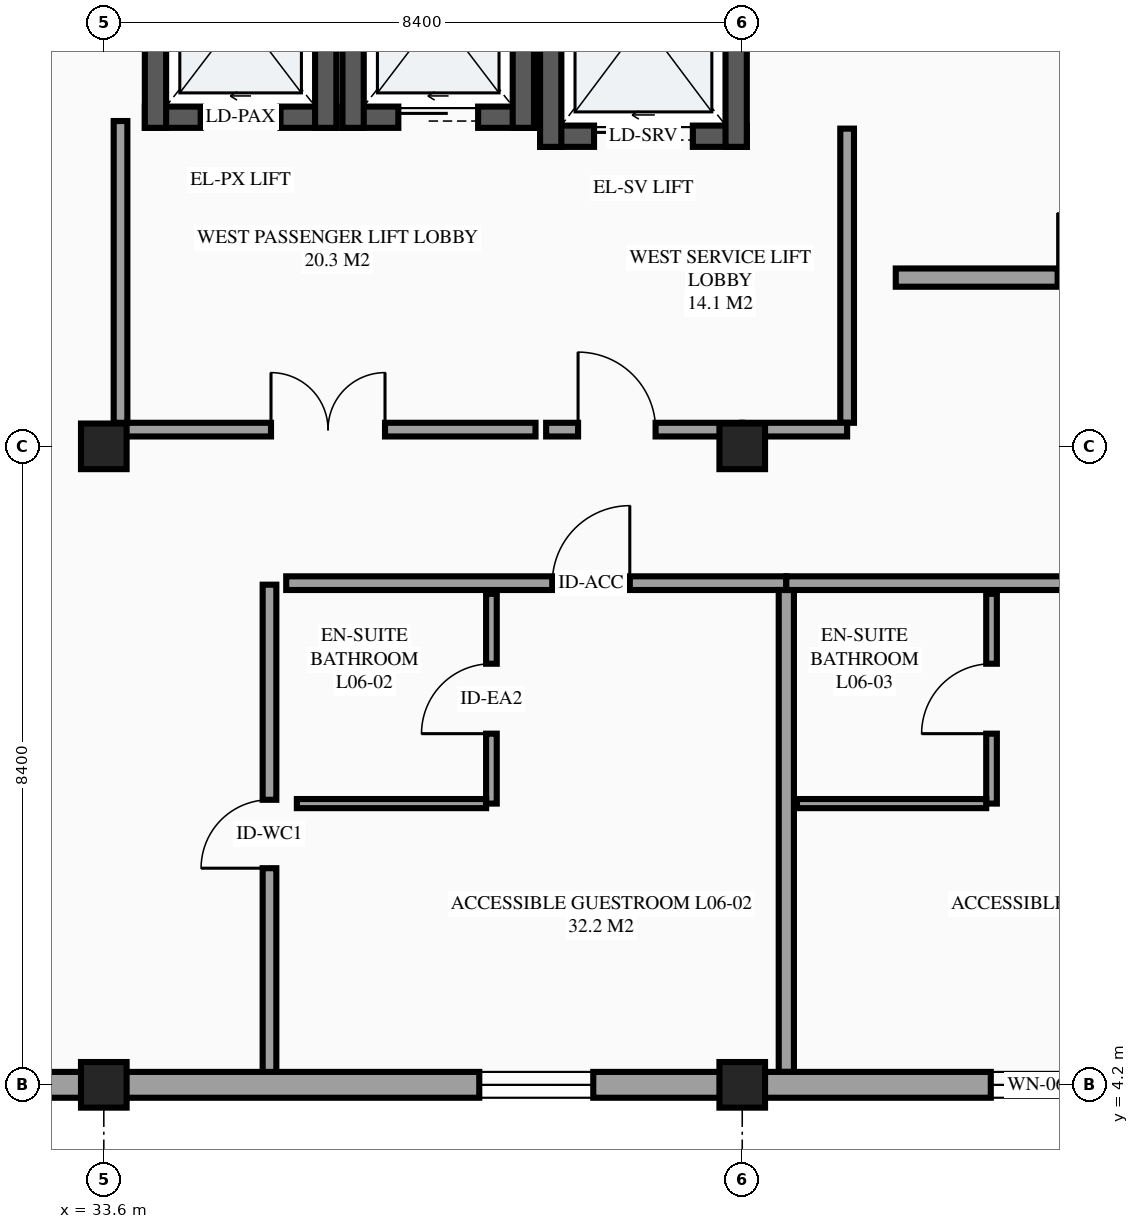
"""IFC4 building model, lengths in metres.
Left out: names, types, materials, properties, quantities, classifications, styles, units other than length and angle.
Written with IfcOpenShell. Run it as: python <this file> out.ifc"""

import sys

from ifc_helpers import new_model, si_unit, direction, frame, frame_2d, origin, origin_2d, place, context, subcontext, project, spatial, rectangle, extrude, element, fill, save


model = new_model("IFC4")
c1 = context("Model", 3, precision=1e-05, world=origin(), true_north=direction((0.0, 1.0)))
c2 = subcontext(c1, "Body", "Model", "MODEL_VIEW")
j1 = project(units=[si_unit("LENGTHUNIT", "METRE"), si_unit("PLANEANGLEUNIT", "RADIAN")], contexts=[c1])
p1 = place(None, origin())
s1 = spatial("IfcSite", under=j1, at=p1, CompositionType="ELEMENT")
p2 = place(p1, origin())
s2 = spatial("IfcBuilding", under=s1, at=p2, CompositionType="ELEMENT")
p3 = place(p2, frame((0.0, 0.0, 25.5)))
s3 = spatial("IfcBuildingStorey", under=s2, at=p3, CompositionType="ELEMENT", Elevation=25.5)
for number, where, z_axis, x_axis in (
    (1, (33.6, 4.2, 0.0), (0.0, 0.0, 1.0), (1.0, 0.0, 0.0)),
    (2, (33.6, 12.6, 0.0), (0.0, 0.0, 1.0), (1.0, 0.0, 0.0)),
    (3, (42.0, 4.2, 0.0), (0.0, 0.0, 1.0), (1.0, 0.0, 0.0)),
    (4, (42.0, 12.6, 0.0), (0.0, 0.0, 1.0), (1.0, 0.0, 0.0)),
):
    element("IfcColumn", number, at=place(p3, frame(where, z_axis=z_axis, x_axis=x_axis)), inside=s3, PredefinedType="COLUMN", context=c2, shape_type="SweptSolid", body=[
        extrude(rectangle(XDim=0.6, YDim=0.6, at=origin_2d()), origin(), (0.0, 0.0, 1.0), 3.6),
    ])
p4 = place(p3, frame((34.14, 16.93, 0.0), z_axis=(0.0, 0.0, 1.0), x_axis=(1.0, 0.0, 0.0)))
e5 = element("IfcWall", 5, at=p4, inside=s3, PredefinedType="SHEAR", context=c2, shape_type="SweptSolid", body=[
    extrude(rectangle(XDim=2.52, YDim=0.28, at=frame_2d((1.26, 0.0))), origin(), (0.0, 0.0, 1.0), 3.6),
])
p5 = place(p4, frame((0.735, 0.0, 0.0)))
e6 = element("IfcOpeningElement", 6, at=p5, cuts=e5, PredefinedType="OPENING", context=c2, shape_type="SweptSolid", body=[
    extrude(rectangle(XDim=1.05, YDim=2.2, at=frame_2d((0.525, 1.1))), frame((0.0, 0.15, 0.0), z_axis=(0.0, -1.0, 0.0), x_axis=(1.0, 0.0, 0.0)), (0.0, 0.0, 1.0), 0.3),
])
for number, where, z_axis, x_axis in (
    (7, (36.52, 16.79, 0.0), (0.0, 0.0, 1.0), (0.0, 1.0, 0.0)),
    (8, (34.28, 19.81, 0.0), (0.0, 0.0, 1.0), (0.0, -1.0, 0.0)),
):
    element("IfcWall", number, at=place(p3, frame(where, z_axis=z_axis, x_axis=x_axis)), inside=s3, PredefinedType="SHEAR", context=c2, shape_type="SweptSolid", body=[
        extrude(rectangle(XDim=3.02, YDim=0.28, at=frame_2d((1.51, 0.0))), origin(), (0.0, 0.0, 1.0), 3.6),
    ])
p6 = place(p3, frame((36.74, 16.93, 0.0), z_axis=(0.0, 0.0, 1.0), x_axis=(1.0, 0.0, 0.0)))
e9 = element("IfcWall", 9, at=p6, inside=s3, PredefinedType="SHEAR", context=c2, shape_type="SweptSolid", body=[
    extrude(rectangle(XDim=2.52, YDim=0.28, at=frame_2d((1.26, 0.0))), origin(), (0.0, 0.0, 1.0), 3.6),
])
p7 = place(p6, frame((0.735, 0.0, 0.0)))
e10 = element("IfcOpeningElement", 10, at=p7, cuts=e9, PredefinedType="OPENING", context=c2, shape_type="SweptSolid", body=[
    extrude(rectangle(XDim=1.05, YDim=2.2, at=frame_2d((0.525, 1.1))), frame((0.0, 0.15, 0.0), z_axis=(0.0, -1.0, 0.0), x_axis=(1.0, 0.0, 0.0)), (0.0, 0.0, 1.0), 0.3),
])
for number, where, z_axis, x_axis in (
    (11, (39.12, 16.79, 0.0), (0.0, 0.0, 1.0), (0.0, 1.0, 0.0)),
    (12, (36.88, 19.81, 0.0), (0.0, 0.0, 1.0), (0.0, -1.0, 0.0)),
):
    element("IfcWall", number, at=place(p3, frame(where, z_axis=z_axis, x_axis=x_axis)), inside=s3, PredefinedType="SHEAR", context=c2, shape_type="SweptSolid", body=[
        extrude(rectangle(XDim=3.02, YDim=0.28, at=frame_2d((1.51, 0.0))), origin(), (0.0, 0.0, 1.0), 3.6),
    ])
p8 = place(p3, frame((39.34, 16.68, 0.0), z_axis=(0.0, 0.0, 1.0), x_axis=(1.0, 0.0, 0.0)))
e13 = element("IfcWall", 13, at=p8, inside=s3, PredefinedType="SHEAR", context=c2, shape_type="SweptSolid", body=[
    extrude(rectangle(XDim=2.72, YDim=0.28, at=frame_2d((1.36, 0.0))), origin(), (0.0, 0.0, 1.0), 3.6),
])
p9 = place(p8, frame((0.71, 0.0, 0.0)))
e14 = element("IfcOpeningElement", 14, at=p9, cuts=e13, PredefinedType="OPENING", context=c2, shape_type="SweptSolid", body=[
    extrude(rectangle(XDim=1.3, YDim=2.25, at=frame_2d((0.65, 1.125))), frame((0.0, 0.15, 0.0), z_axis=(0.0, -1.0, 0.0), x_axis=(1.0, 0.0, 0.0)), (0.0, 0.0, 1.0), 0.3),
])
for number, where, z_axis, x_axis in (
    (15, (41.92, 16.54, 0.0), (0.0, 0.0, 1.0), (0.0, 1.0, 0.0)),
    (16, (39.48, 19.86, 0.0), (0.0, 0.0, 1.0), (0.0, -1.0, 0.0)),
):
    element("IfcWall", number, at=place(p3, frame(where, z_axis=z_axis, x_axis=x_axis)), inside=s3, PredefinedType="SHEAR", context=c2, shape_type="SweptSolid", body=[
        extrude(rectangle(XDim=3.32, YDim=0.28, at=frame_2d((1.66, 0.0))), origin(), (0.0, 0.0, 1.0), 3.6),
    ])
p10 = place(p3, frame((36.0, 10.8, 0.0), z_axis=(0.0, 0.0, 1.0), x_axis=(1.0, 0.0, 0.0)))
e17 = element("IfcWall", 17, at=p10, inside=s3, PredefinedType="PARTITIONING", context=c2, shape_type="SweptSolid", body=[
    extrude(rectangle(XDim=6.58, YDim=0.18, at=frame_2d((3.29, 0.0))), origin(), (0.0, 0.0, 1.0), 3.375),
])
p11 = place(p10, frame((3.5, 0.0, 0.0)))
e18 = element("IfcOpeningElement", 18, at=p11, cuts=e17, PredefinedType="OPENING", context=c2, shape_type="SweptSolid", body=[
    extrude(rectangle(XDim=1.02, YDim=2.15, at=frame_2d((0.51, 1.075))), frame((0.0, 0.1, 0.0), z_axis=(0.0, -1.0, 0.0), x_axis=(1.0, 0.0, 0.0)), (0.0, 0.0, 1.0), 0.2),
])
p12 = place(p3, frame((42.58, 4.37, 0.0), z_axis=(0.0, 0.0, 1.0), x_axis=(0.0, 1.0, 0.0)))
e19 = element("IfcWall", 19, at=p12, inside=s3, PredefinedType="PARTITIONING", context=c2, shape_type="SweptSolid", body=[
    extrude(rectangle(XDim=6.34, YDim=0.2, at=frame_2d((3.17, 0.0))), origin(), (0.0, 0.0, 1.0), 3.375),
])
p13 = place(p3, frame((38.7, 7.9, 0.0), z_axis=(0.0, 0.0, 1.0), x_axis=(0.0, 1.0, 0.0)))
e20 = element("IfcWall", 20, at=p13, inside=s3, PredefinedType="PARTITIONING", context=c2, shape_type="SweptSolid", body=[
    extrude(rectangle(XDim=2.76, YDim=0.14, at=frame_2d((1.38, 0.0))), origin(), (0.0, 0.0, 1.0), 3.375),
])
p14 = place(p13, frame((0.92, 0.0, 0.0)))
e21 = element("IfcOpeningElement", 21, at=p14, cuts=e20, PredefinedType="OPENING", context=c2, shape_type="SweptSolid", body=[
    extrude(rectangle(XDim=0.92, YDim=2.1, at=frame_2d((0.46, 1.05))), frame((0.0, 0.08, 0.0), z_axis=(0.0, -1.0, 0.0), x_axis=(1.0, 0.0, 0.0)), (0.0, 0.0, 1.0), 0.16),
])
p15 = place(p3, frame((36.14, 7.9, 0.0), z_axis=(0.0, 0.0, 1.0), x_axis=(1.0, 0.0, 0.0)))
e22 = element("IfcWall", 22, at=p15, inside=s3, PredefinedType="PARTITIONING", context=c2, shape_type="SweptSolid", body=[
    extrude(rectangle(XDim=2.49, YDim=0.12, at=frame_2d((1.245, 0.0))), origin(), (0.0, 0.0, 1.0), 3.375),
])
p16 = place(p3, frame((42.58, 10.8, 0.0), z_axis=(0.0, 0.0, 1.0), x_axis=(1.0, 0.0, 0.0)))
e23 = element("IfcWall", 23, at=p16, inside=s3, PredefinedType="PARTITIONING", context=c2, shape_type="SweptSolid", body=[
    extrude(rectangle(XDim=6.58, YDim=0.18, at=frame_2d((3.29, 0.0))), origin(), (0.0, 0.0, 1.0), 3.375),
])
p17 = place(p16, frame((4.551, 0.0, 0.0)))
e24 = element("IfcOpeningElement", 24, at=p17, cuts=e23, PredefinedType="OPENING", context=c2, shape_type="SweptSolid", body=[
    extrude(rectangle(XDim=1.02, YDim=2.15, at=frame_2d((0.51, 1.075))), frame((0.0, 0.1, 0.0), z_axis=(0.0, -1.0, 0.0), x_axis=(1.0, 0.0, 0.0)), (0.0, 0.0, 1.0), 0.2),
])
p18 = place(p3, frame((45.28, 7.9, 0.0), z_axis=(0.0, 0.0, 1.0), x_axis=(0.0, 1.0, 0.0)))
e25 = element("IfcWall", 25, at=p18, inside=s3, PredefinedType="PARTITIONING", context=c2, shape_type="SweptSolid", body=[
    extrude(rectangle(XDim=2.76, YDim=0.14, at=frame_2d((1.38, 0.0))), origin(), (0.0, 0.0, 1.0), 3.375),
])
p19 = place(p18, frame((0.92, 0.0, 0.0)))
e26 = element("IfcOpeningElement", 26, at=p19, cuts=e25, PredefinedType="OPENING", context=c2, shape_type="SweptSolid", body=[
    extrude(rectangle(XDim=0.92, YDim=2.1, at=frame_2d((0.46, 1.05))), frame((0.0, 0.08, 0.0), z_axis=(0.0, -1.0, 0.0), x_axis=(1.0, 0.0, 0.0)), (0.0, 0.0, 1.0), 0.16),
])
p20 = place(p3, frame((42.72, 7.9, 0.0), z_axis=(0.0, 0.0, 1.0), x_axis=(1.0, 0.0, 0.0)))
e27 = element("IfcWall", 27, at=p20, inside=s3, PredefinedType="PARTITIONING", context=c2, shape_type="SweptSolid", body=[
    extrude(rectangle(XDim=2.49, YDim=0.12, at=frame_2d((1.245, 0.0))), origin(), (0.0, 0.0, 1.0), 3.375),
])
p21 = place(p3, frame((33.82, 12.82, 0.0), z_axis=(0.0, 0.0, 1.0), x_axis=(1.0, 0.0, 0.0)))
e28 = element("IfcWall", 28, at=p21, inside=s3, PredefinedType="PARTITIONING", context=c2, shape_type="SweptSolid", body=[
    extrude(rectangle(XDim=5.46, YDim=0.18, at=frame_2d((2.73, 0.0))), origin(), (0.0, 0.0, 1.0), 2.48),
])
p22 = place(p21, frame((1.98, 0.0, 0.0)))
e29 = element("IfcOpeningElement", 29, at=p22, cuts=e28, PredefinedType="OPENING", context=c2, shape_type="SweptSolid", body=[
    extrude(rectangle(XDim=1.5, YDim=2.15, at=frame_2d((0.75, 1.075))), frame((0.0, 0.1, 0.0), z_axis=(0.0, -1.0, 0.0), x_axis=(1.0, 0.0, 0.0)), (0.0, 0.0, 1.0), 0.2),
])
p23 = place(p3, frame((33.82, 12.91, 0.0), z_axis=(0.0, 0.0, 1.0), x_axis=(0.0, 1.0, 0.0)))
e30 = element("IfcWall", 30, at=p23, inside=s3, PredefinedType="PARTITIONING", context=c2, shape_type="SweptSolid", body=[
    extrude(rectangle(XDim=3.97, YDim=0.18, at=frame_2d((1.985, 0.0))), origin(), (0.0, 0.0, 1.0), 2.53),
])
p24 = place(p3, frame((39.42, 12.82, 0.0), z_axis=(0.0, 0.0, 1.0), x_axis=(1.0, 0.0, 0.0)))
e31 = element("IfcWall", 31, at=p24, inside=s3, PredefinedType="PARTITIONING", context=c2, shape_type="SweptSolid", body=[
    extrude(rectangle(XDim=2.58, YDim=0.18, at=frame_2d((1.29, 0.0))), origin(), (0.0, 0.0, 1.0), 2.48),
])
p25 = place(p24, frame((0.42, 0.0, 0.0)))
e32 = element("IfcOpeningElement", 32, at=p25, cuts=e31, PredefinedType="OPENING", context=c2, shape_type="SweptSolid", body=[
    extrude(rectangle(XDim=1.02, YDim=2.15, at=frame_2d((0.51, 1.075))), frame((0.0, 0.1, 0.0), z_axis=(0.0, -1.0, 0.0), x_axis=(1.0, 0.0, 0.0)), (0.0, 0.0, 1.0), 0.2),
])
p26 = place(p3, frame((43.38, 12.91, 0.0), z_axis=(0.0, 0.0, 1.0), x_axis=(0.0, 1.0, 0.0)))
e33 = element("IfcWall", 33, at=p26, inside=s3, PredefinedType="PARTITIONING", context=c2, shape_type="SweptSolid", body=[
    extrude(rectangle(XDim=3.87, YDim=0.18, at=frame_2d((1.935, 0.0))), origin(), (0.0, 0.0, 1.0), 3.375),
])
p27 = place(p3, frame((44.02, 14.82, 0.0), z_axis=(0.0, 0.0, 1.0), x_axis=(1.0, 0.0, 0.0)))
e34 = element("IfcWall", 34, at=p27, inside=s3, PredefinedType="PARTITIONING", context=c2, shape_type="SweptSolid", body=[
    extrude(rectangle(XDim=5.96, YDim=0.24, at=frame_2d((2.98, 0.0))), origin(), (0.0, 0.0, 1.0), 3.375),
])
p28 = place(p27, frame((2.13, 0.0, 0.0)))
e35 = element("IfcOpeningElement", 35, at=p28, cuts=e34, PredefinedType="OPENING", context=c2, shape_type="SweptSolid", body=[
    extrude(rectangle(XDim=1.7, YDim=2.2, at=frame_2d((0.85, 1.1))), frame((0.0, 0.13, 0.0), z_axis=(0.0, -1.0, 0.0), x_axis=(1.0, 0.0, 0.0)), (0.0, 0.0, 1.0), 0.26),
])
p29 = place(p3, frame((35.78, 4.22, 0.0), z_axis=(0.0, 0.0, 1.0), x_axis=(0.0, 1.0, 0.0)))
e36 = element("IfcWall", 36, at=p29, inside=s3, PredefinedType="PARTITIONING", context=c2, shape_type="SweptSolid", body=[
    extrude(rectangle(XDim=6.56, YDim=0.18, at=frame_2d((3.28, 0.0))), origin(), (0.0, 0.0, 1.0), 3.375),
])
p30 = place(p29, frame((2.83, 0.0, 0.0)))
e37 = element("IfcOpeningElement", 37, at=p30, cuts=e36, PredefinedType="OPENING", context=c2, shape_type="SweptSolid", body=[
    extrude(rectangle(XDim=0.9, YDim=2.12, at=frame_2d((0.45, 1.06))), frame((0.0, 0.1, 0.0), z_axis=(0.0, -1.0, 0.0), x_axis=(1.0, 0.0, 0.0)), (0.0, 0.0, 1.0), 0.2),
])
p31 = place(p3, frame((25.2, 4.2, 0.0), z_axis=(0.0, 0.0, 1.0), x_axis=(1.0, 0.0, 0.0)))
e38 = element("IfcWall", 38, at=p31, inside=s3, PredefinedType="STANDARD", context=c2, shape_type="SweptSolid", body=[
    extrude(rectangle(XDim=8.4, YDim=0.34, at=frame_2d((4.2, 0.0))), origin(), (0.0, 0.0, 1.0), 2.63),
])
p32 = place(p31, frame((2.25, 0.0, 0.75)))
e39 = element("IfcOpeningElement", 39, at=p32, cuts=e38, PredefinedType="OPENING", context=c2, shape_type="SweptSolid", body=[
    extrude(rectangle(XDim=2.1, YDim=1.5, at=frame_2d((1.05, 0.75))), frame((0.0, 0.18, 0.0), z_axis=(0.0, -1.0, 0.0), x_axis=(1.0, 0.0, 0.0)), (0.0, 0.0, 1.0), 0.36),
])
p33 = place(p3, frame((33.6, 4.2, 0.0), z_axis=(0.0, 0.0, 1.0), x_axis=(1.0, 0.0, 0.0)))
e40 = element("IfcWall", 40, at=p33, inside=s3, PredefinedType="STANDARD", context=c2, shape_type="SweptSolid", body=[
    extrude(rectangle(XDim=8.4, YDim=0.34, at=frame_2d((4.2, 0.0))), origin(), (0.0, 0.0, 1.0), 3.07),
])
p34 = place(p33, frame((4.94, 0.0, 0.85)))
e41 = element("IfcOpeningElement", 41, at=p34, cuts=e40, PredefinedType="OPENING", context=c2, shape_type="SweptSolid", body=[
    extrude(rectangle(XDim=1.5, YDim=1.5, at=frame_2d((0.75, 0.75))), frame((0.0, 0.18, 0.0), z_axis=(0.0, -1.0, 0.0), x_axis=(1.0, 0.0, 0.0)), (0.0, 0.0, 1.0), 0.36),
])
p35 = place(p3, frame((42.0, 4.2, 0.0), z_axis=(0.0, 0.0, 1.0), x_axis=(1.0, 0.0, 0.0)))
e42 = element("IfcWall", 42, at=p35, inside=s3, PredefinedType="STANDARD", context=c2, shape_type="SweptSolid", body=[
    extrude(rectangle(XDim=16.8, YDim=0.34, at=frame_2d((8.4, 0.0))), origin(), (0.0, 0.0, 1.0), 2.68),
])
p36 = place(p35, frame((3.27, 0.0, 0.85)))
e43 = element("IfcOpeningElement", 43, at=p36, cuts=e42, PredefinedType="OPENING", context=c2, shape_type="SweptSolid", body=[
    extrude(rectangle(XDim=1.2, YDim=1.5, at=frame_2d((0.6, 0.75))), frame((0.0, 0.18, 0.0), z_axis=(0.0, -1.0, 0.0), x_axis=(1.0, 0.0, 0.0)), (0.0, 0.0, 1.0), 0.36),
])
p37 = place(p35, frame((9.7, 0.0, 0.85)))
e44 = element("IfcOpeningElement", 44, at=p37, cuts=e42, PredefinedType="OPENING", context=c2, shape_type="SweptSolid", body=[
    extrude(rectangle(XDim=1.5, YDim=1.5, at=frame_2d((0.75, 0.75))), frame((0.0, 0.18, 0.0), z_axis=(0.0, -1.0, 0.0), x_axis=(1.0, 0.0, 0.0)), (0.0, 0.0, 1.0), 0.36),
])
p38 = place(p3, frame((42.0, 12.82, 0.0), z_axis=(0.0, 0.0, 1.0), x_axis=(1.0, 0.0, 0.0)))
e45 = element("IfcWall", 45, at=p38, inside=s3, PredefinedType="PARTITIONING", context=c2, shape_type="SweptSolid", body=[
    extrude(rectangle(XDim=1.38, YDim=0.18, at=frame_2d((0.69, 0.0))), origin(), (0.0, 0.0, 1.0), 2.58),
])
p39 = place(p34, origin())
e46 = element("IfcWindow", 46, at=p39, inside=s3, PartitioningType="SINGLE_PANEL", PredefinedType="WINDOW", context=c2, shape_type="SweptSolid", body=[
    extrude(rectangle(XDim=1.5, YDim=1.5, at=frame_2d((0.75, 0.75))), frame((0.0, 0.03, 0.0), z_axis=(0.0, -1.0, 0.0), x_axis=(1.0, 0.0, 0.0)), (0.0, 0.0, 1.0), 0.06),
])
fill(e41, e46)
p40 = place(p36, origin())
e47 = element("IfcWindow", 47, at=p40, inside=s3, PartitioningType="SINGLE_PANEL", PredefinedType="WINDOW", context=c2, shape_type="SweptSolid", body=[
    extrude(rectangle(XDim=1.2, YDim=1.5, at=frame_2d((0.6, 0.75))), frame((0.0, 0.03, 0.0), z_axis=(0.0, -1.0, 0.0), x_axis=(1.0, 0.0, 0.0)), (0.0, 0.0, 1.0), 0.06),
])
fill(e43, e47)
p41 = place(p5, origin())
e48 = element("IfcDoor", 48, at=p41, inside=s3, OperationType="SLIDING_TO_LEFT", PredefinedType="DOOR", context=c2, shape_type="SweptSolid", body=[
    extrude(rectangle(XDim=1.05, YDim=2.2, at=frame_2d((0.525, 1.1))), frame((0.0, 0.025, 0.0), z_axis=(0.0, -1.0, 0.0), x_axis=(1.0, 0.0, 0.0)), (0.0, 0.0, 1.0), 0.05),
])
fill(e6, e48)
p42 = place(p7, origin())
e49 = element("IfcDoor", 49, at=p42, inside=s3, OperationType="SLIDING_TO_LEFT", PredefinedType="DOOR", context=c2, shape_type="SweptSolid", body=[
    extrude(rectangle(XDim=1.05, YDim=2.2, at=frame_2d((0.525, 1.1))), frame((0.0, 0.025, 0.0), z_axis=(0.0, -1.0, 0.0), x_axis=(1.0, 0.0, 0.0)), (0.0, 0.0, 1.0), 0.05),
])
fill(e10, e49)
p43 = place(p9, origin())
e50 = element("IfcDoor", 50, at=p43, inside=s3, OperationType="SLIDING_TO_LEFT", PredefinedType="DOOR", context=c2, shape_type="SweptSolid", body=[
    extrude(rectangle(XDim=1.3, YDim=2.25, at=frame_2d((0.65, 1.125))), frame((0.0, 0.025, 0.0), z_axis=(0.0, -1.0, 0.0), x_axis=(1.0, 0.0, 0.0)), (0.0, 0.0, 1.0), 0.05),
])
fill(e14, e50)
p44 = place(p11, origin())
e51 = element("IfcDoor", 51, at=p44, inside=s3, OperationType="SINGLE_SWING_RIGHT", PredefinedType="DOOR", context=c2, shape_type="SweptSolid", body=[
    extrude(rectangle(XDim=1.02, YDim=2.15, at=frame_2d((0.51, 1.075))), frame((0.0, 0.025, 0.0), z_axis=(0.0, -1.0, 0.0), x_axis=(1.0, 0.0, 0.0)), (0.0, 0.0, 1.0), 0.05),
])
fill(e18, e51)
p45 = place(p14, origin())
e52 = element("IfcDoor", 52, at=p45, inside=s3, OperationType="SINGLE_SWING_LEFT", PredefinedType="DOOR", context=c2, shape_type="SweptSolid", body=[
    extrude(rectangle(XDim=0.92, YDim=2.1, at=frame_2d((0.46, 1.05))), frame((0.0, 0.025, 0.0), z_axis=(0.0, -1.0, 0.0), x_axis=(1.0, 0.0, 0.0)), (0.0, 0.0, 1.0), 0.05),
])
fill(e21, e52)
p46 = place(p19, origin())
e53 = element("IfcDoor", 53, at=p46, inside=s3, OperationType="SINGLE_SWING_LEFT", PredefinedType="DOOR", context=c2, shape_type="SweptSolid", body=[
    extrude(rectangle(XDim=0.92, YDim=2.1, at=frame_2d((0.46, 1.05))), frame((0.0, 0.025, 0.0), z_axis=(0.0, -1.0, 0.0), x_axis=(1.0, 0.0, 0.0)), (0.0, 0.0, 1.0), 0.05),
])
fill(e26, e53)
p47 = place(p22, origin())
e54 = element("IfcDoor", 54, at=p47, inside=s3, OperationType="DOUBLE_DOOR_SINGLE_SWING", PredefinedType="DOOR", context=c2, shape_type="SweptSolid", body=[
    extrude(rectangle(XDim=1.5, YDim=2.15, at=frame_2d((0.75, 1.075))), frame((0.0, 0.025, 0.0), z_axis=(0.0, -1.0, 0.0), x_axis=(1.0, 0.0, 0.0)), (0.0, 0.0, 1.0), 0.05),
])
fill(e29, e54)
p48 = place(p25, origin())
e55 = element("IfcDoor", 55, at=p48, inside=s3, OperationType="SINGLE_SWING_LEFT", PredefinedType="DOOR", context=c2, shape_type="SweptSolid", body=[
    extrude(rectangle(XDim=1.02, YDim=2.15, at=frame_2d((0.51, 1.075))), frame((0.0, 0.025, 0.0), z_axis=(0.0, -1.0, 0.0), x_axis=(1.0, 0.0, 0.0)), (0.0, 0.0, 1.0), 0.05),
])
fill(e32, e55)
p49 = place(p28, origin())
e56 = element("IfcDoor", 56, at=p49, inside=s3, OperationType="DOUBLE_DOOR_SINGLE_SWING", PredefinedType="DOOR", context=c2, shape_type="SweptSolid", body=[
    extrude(rectangle(XDim=1.7, YDim=2.2, at=frame_2d((0.85, 1.1))), frame((0.0, 0.025, 0.0), z_axis=(0.0, -1.0, 0.0), x_axis=(1.0, 0.0, 0.0)), (0.0, 0.0, 1.0), 0.05),
])
fill(e35, e56)
p50 = place(p30, origin())
e57 = element("IfcDoor", 57, at=p50, inside=s3, OperationType="SINGLE_SWING_LEFT", PredefinedType="DOOR", context=c2, shape_type="SweptSolid", body=[
    extrude(rectangle(XDim=0.9, YDim=2.12, at=frame_2d((0.45, 1.06))), frame((0.0, 0.025, 0.0), z_axis=(0.0, -1.0, 0.0), x_axis=(1.0, 0.0, 0.0)), (0.0, 0.0, 1.0), 0.05),
])
fill(e37, e57)
save(model, sys.argv[1])
